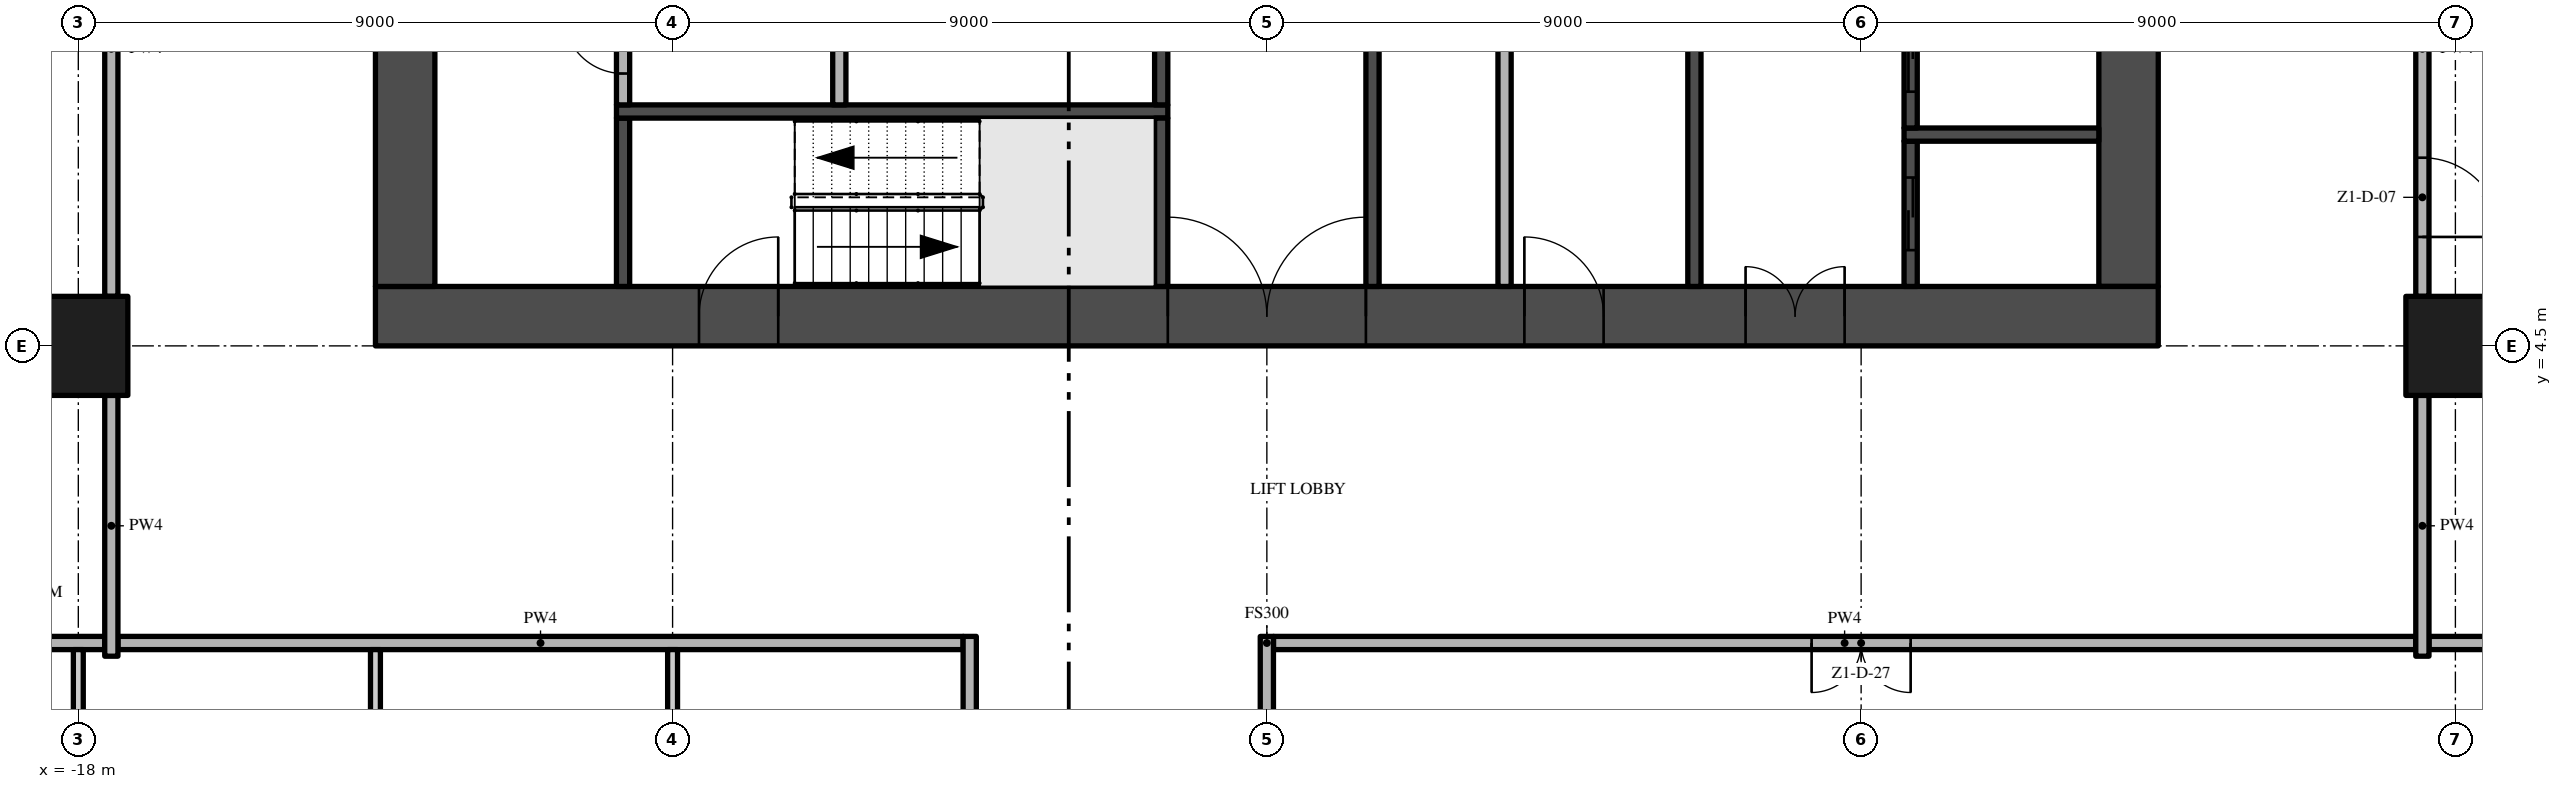
"""IFC4 building model, lengths in metres.
Left out: names, types, materials, properties, quantities, classifications, styles, units other than length and angle.
Written with IfcOpenShell. Run it as: python <this file> out.ifc"""

import sys

from ifc_helpers import new_model, si_unit, direction, frame, frame_2d, origin, origin_2d, place, context, subcontext, project, spatial, rectangle, extrude, element, fill, save


model = new_model("IFC4")
c1 = context("Model", 3, precision=1e-05, world=origin(), true_north=direction((0.0, 1.0)))
c2 = subcontext(c1, "Body", "Model", "MODEL_VIEW")
j1 = project(units=[si_unit("LENGTHUNIT", "METRE"), si_unit("PLANEANGLEUNIT", "RADIAN")], contexts=[c1])
p1 = place(None, origin())
s1 = spatial("IfcSite", under=j1, at=p1, CompositionType="ELEMENT")
p2 = place(p1, origin())
s2 = spatial("IfcBuilding", under=s1, at=p2, CompositionType="ELEMENT")
p3 = place(p2, frame((0.0, 0.0, 53.0)))
s3 = spatial("IfcBuildingStorey", under=s2, at=p3, CompositionType="ELEMENT", Elevation=53.0)
p4 = place(p3, frame((-13.5, 4.95, -0.3), z_axis=(0.0, 0.0, 1.0), x_axis=(1.0, 0.0, 0.0)))
e1 = element("IfcWall", 1, at=p4, inside=s3, PredefinedType="SHEAR", context=c2, shape_type="SweptSolid", body=[
    extrude(rectangle(XDim=27.0, YDim=0.9, at=frame_2d((13.5, 0.0))), origin(), (0.0, 0.0, 1.0), 3.8),
])
p5 = place(p4, frame((12.0, 0.0, 0.3)))
e2 = element("IfcOpeningElement", 2, at=p5, cuts=e1, PredefinedType="OPENING", context=c2, shape_type="SweptSolid", body=[
    extrude(rectangle(XDim=3.0, YDim=2.4, at=frame_2d((1.5, 1.2))), frame((0.0, 0.46, 0.0), z_axis=(0.0, -1.0, 0.0), x_axis=(1.0, 0.0, 0.0)), (0.0, 0.0, 1.0), 0.92),
])
p6 = place(p4, frame((4.9, 0.0, 0.3)))
e3 = element("IfcOpeningElement", 3, at=p6, cuts=e1, PredefinedType="OPENING", context=c2, shape_type="SweptSolid", body=[
    extrude(rectangle(XDim=1.2, YDim=2.2, at=frame_2d((0.6, 1.1))), frame((0.0, 0.46, 0.0), z_axis=(0.0, -1.0, 0.0), x_axis=(1.0, 0.0, 0.0)), (0.0, 0.0, 1.0), 0.92),
])
p7 = place(p4, frame((20.75, 0.0, 0.3)))
e4 = element("IfcOpeningElement", 4, at=p7, cuts=e1, PredefinedType="OPENING", context=c2, shape_type="SweptSolid", body=[
    extrude(rectangle(XDim=1.5, YDim=2.2, at=frame_2d((0.75, 1.1))), frame((0.0, 0.46, 0.0), z_axis=(0.0, -1.0, 0.0), x_axis=(1.0, 0.0, 0.0)), (0.0, 0.0, 1.0), 0.92),
])
p8 = place(p4, frame((17.4, 0.0, 0.3)))
e5 = element("IfcOpeningElement", 5, at=p8, cuts=e1, PredefinedType="OPENING", context=c2, shape_type="SweptSolid", body=[
    extrude(rectangle(XDim=1.2, YDim=2.2, at=frame_2d((0.6, 1.1))), frame((0.0, 0.46, 0.0), z_axis=(0.0, -1.0, 0.0), x_axis=(1.0, 0.0, 0.0)), (0.0, 0.0, 1.0), 0.92),
])
p9 = place(p3, frame((13.05, 5.4, -0.3), z_axis=(0.0, 0.0, 1.0), x_axis=(0.0, 1.0, 0.0)))
e6 = element("IfcWall", 6, at=p9, inside=s3, PredefinedType="SHEAR", context=c2, shape_type="SweptSolid", body=[
    extrude(rectangle(XDim=16.2, YDim=0.9, at=frame_2d((8.1, 0.0))), origin(), (0.0, 0.0, 1.0), 3.8),
])
p10 = place(p9, frame((6.0, 0.0, 0.3)))
e7 = element("IfcOpeningElement", 7, at=p10, cuts=e6, PredefinedType="OPENING", context=c2, shape_type="SweptSolid", body=[
    extrude(rectangle(XDim=1.2, YDim=2.2, at=frame_2d((0.6, 1.1))), frame((0.0, 0.46, 0.0), z_axis=(0.0, -1.0, 0.0), x_axis=(1.0, 0.0, 0.0)), (0.0, 0.0, 1.0), 0.92),
])
p11 = place(p3, frame((-13.05, 21.6, -0.3), z_axis=(0.0, 0.0, 1.0), x_axis=(0.0, -1.0, 0.0)))
e8 = element("IfcWall", 8, at=p11, inside=s3, PredefinedType="SHEAR", context=c2, shape_type="SweptSolid", body=[
    extrude(rectangle(XDim=16.2, YDim=0.9, at=frame_2d((8.1, 0.0))), origin(), (0.0, 0.0, 1.0), 3.8),
])
p12 = place(p11, frame((9.0, 0.0, 0.3)))
e9 = element("IfcOpeningElement", 9, at=p12, cuts=e8, PredefinedType="OPENING", context=c2, shape_type="SweptSolid", body=[
    extrude(rectangle(XDim=1.2, YDim=2.2, at=frame_2d((0.6, 1.1))), frame((0.0, 0.46, 0.0), z_axis=(0.0, -1.0, 0.0), x_axis=(1.0, 0.0, 0.0)), (0.0, 0.0, 1.0), 0.92),
])
for number, where, z_axis, x_axis in (
    (10, (-18.0, 4.5, 0.0), (0.0, 0.0, 1.0), (1.0, 0.0, 0.0)),
    (11, (18.0, 4.5, 0.0), (0.0, 0.0, 1.0), (1.0, 0.0, 0.0)),
):
    element("IfcColumn", number, at=place(p3, frame(where, z_axis=z_axis, x_axis=x_axis)), inside=s3, PredefinedType="COLUMN", context=c2, shape_type="SweptSolid", body=[
        extrude(rectangle(XDim=1.5, YDim=1.5, at=origin_2d()), origin(), (0.0, 0.0, 1.0), 3.5),
    ])
p13 = place(p3, frame((-9.75, 5.4, 0.0), z_axis=(0.0, 0.0, 1.0), x_axis=(0.0, 1.0, 0.0)))
e12 = element("IfcWall", 12, at=p13, inside=s3, PredefinedType="SHEAR", context=c2, shape_type="SweptSolid", body=[
    extrude(rectangle(XDim=2.55, YDim=0.2, at=frame_2d((1.275, 0.0))), origin(), (0.0, 0.0, 1.0), 3.5),
])
p14 = place(p3, frame((-9.85, 8.05, 0.0), z_axis=(0.0, 0.0, 1.0), x_axis=(1.0, 0.0, 0.0)))
e13 = element("IfcWall", 13, at=p14, inside=s3, PredefinedType="SHEAR", context=c2, shape_type="SweptSolid", body=[
    extrude(rectangle(XDim=8.35, YDim=0.2, at=frame_2d((4.175, 0.0))), origin(), (0.0, 0.0, 1.0), 3.5),
])
p15 = place(p3, frame((-9.75, 8.15, 0.0), z_axis=(0.0, 0.0, 1.0), x_axis=(0.0, 1.0, 0.0)))
e14 = element("IfcWall", 14, at=p15, inside=s3, PredefinedType="PARTITIONING", context=c2, shape_type="SweptSolid", body=[
    extrude(rectangle(XDim=1.85, YDim=0.2, at=frame_2d((0.925, 0.0))), origin(), (0.0, 0.0, 1.0), 3.5),
])
p16 = place(p15, frame((0.475, 0.0, 0.0)))
e15 = element("IfcOpeningElement", 15, at=p16, cuts=e14, PredefinedType="OPENING", context=c2, shape_type="SweptSolid", body=[
    extrude(rectangle(XDim=0.9, YDim=2.1, at=frame_2d((0.45, 1.05))), frame((0.0, 0.11, 0.0), z_axis=(0.0, -1.0, 0.0), x_axis=(1.0, 0.0, 0.0)), (0.0, 0.0, 1.0), 0.22),
])
p17 = place(p3, frame((-6.475, 8.15, 0.0), z_axis=(0.0, 0.0, 1.0), x_axis=(0.0, 1.0, 0.0)))
e16 = element("IfcWall", 16, at=p17, inside=s3, PredefinedType="PARTITIONING", context=c2, shape_type="SweptSolid", body=[
    extrude(rectangle(XDim=5.35, YDim=0.2, at=frame_2d((2.675, 0.0))), origin(), (0.0, 0.0, 1.0), 3.5),
])
p18 = place(p3, frame((-1.6, 5.4, 0.0), z_axis=(0.0, 0.0, 1.0), x_axis=(0.0, 1.0, 0.0)))
e17 = element("IfcWall", 17, at=p18, inside=s3, PredefinedType="SHEAR", context=c2, shape_type="SweptSolid", body=[
    extrude(rectangle(XDim=2.55, YDim=0.2, at=frame_2d((1.275, 0.0))), origin(), (0.0, 0.0, 1.0), 3.5),
])
p19 = place(p3, frame((-1.6, 8.15, 0.0), z_axis=(0.0, 0.0, 1.0), x_axis=(0.0, 1.0, 0.0)))
e18 = element("IfcWall", 18, at=p19, inside=s3, PredefinedType="SHEAR", context=c2, shape_type="SweptSolid", body=[
    extrude(rectangle(XDim=5.35, YDim=0.2, at=frame_2d((2.675, 0.0))), origin(), (0.0, 0.0, 1.0), 3.5),
])
p20 = place(p19, frame((2.225, 0.0, 0.0)))
e19 = element("IfcOpeningElement", 19, at=p20, cuts=e18, PredefinedType="OPENING", context=c2, shape_type="SweptSolid", body=[
    extrude(rectangle(XDim=0.9, YDim=2.1, at=frame_2d((0.45, 1.05))), frame((0.0, 0.11, 0.0), z_axis=(0.0, -1.0, 0.0), x_axis=(1.0, 0.0, 0.0)), (0.0, 0.0, 1.0), 0.22),
])
p21 = place(p3, frame((1.6, 13.5, 0.0), z_axis=(0.0, 0.0, 1.0), x_axis=(0.0, -1.0, 0.0)))
e20 = element("IfcWall", 20, at=p21, inside=s3, PredefinedType="SHEAR", context=c2, shape_type="SweptSolid", body=[
    extrude(rectangle(XDim=8.1, YDim=0.2, at=frame_2d((4.05, 0.0))), origin(), (0.0, 0.0, 1.0), 3.5),
])
p22 = place(p21, frame((3.2, 0.0, 0.0)))
e21 = element("IfcOpeningElement", 21, at=p22, cuts=e20, PredefinedType="OPENING", context=c2, shape_type="SweptSolid", body=[
    extrude(rectangle(XDim=0.9, YDim=2.1, at=frame_2d((0.45, 1.05))), frame((0.0, 0.11, 0.0), z_axis=(0.0, -1.0, 0.0), x_axis=(1.0, 0.0, 0.0)), (0.0, 0.0, 1.0), 0.22),
])
p23 = place(p3, frame((3.6, 13.5, 0.0), z_axis=(0.0, 0.0, 1.0), x_axis=(0.0, -1.0, 0.0)))
e22 = element("IfcWall", 22, at=p23, inside=s3, PredefinedType="PARTITIONING", context=c2, shape_type="SweptSolid", body=[
    extrude(rectangle(XDim=8.1, YDim=0.2, at=frame_2d((4.05, 0.0))), origin(), (0.0, 0.0, 1.0), 3.5),
])
p24 = place(p23, frame((3.6, 0.0, 0.0)))
e23 = element("IfcOpeningElement", 23, at=p24, cuts=e22, PredefinedType="OPENING", context=c2, shape_type="SweptSolid", body=[
    extrude(rectangle(XDim=0.9, YDim=2.1, at=frame_2d((0.45, 1.05))), frame((0.0, 0.11, 0.0), z_axis=(0.0, -1.0, 0.0), x_axis=(1.0, 0.0, 0.0)), (0.0, 0.0, 1.0), 0.22),
])
p25 = place(p3, frame((6.475, 5.4, 0.0), z_axis=(0.0, 0.0, 1.0), x_axis=(0.0, 1.0, 0.0)))
e24 = element("IfcWall", 24, at=p25, inside=s3, PredefinedType="SHEAR", context=c2, shape_type="SweptSolid", body=[
    extrude(rectangle(XDim=6.7, YDim=0.2, at=frame_2d((3.35, 0.0))), origin(), (0.0, 0.0, 1.0), 3.5),
])
p26 = place(p3, frame((9.75, 5.4, 0.0), z_axis=(0.0, 0.0, 1.0), x_axis=(0.0, 1.0, 0.0)))
e25 = element("IfcWall", 25, at=p26, inside=s3, PredefinedType="SHEAR", context=c2, shape_type="SweptSolid", body=[
    extrude(rectangle(XDim=2.2, YDim=0.2, at=frame_2d((1.1, 0.0))), origin(), (0.0, 0.0, 1.0), 3.5),
])
p27 = place(p26, frame((0.55, 0.0, 0.0)))
e26 = element("IfcOpeningElement", 26, at=p27, cuts=e25, PredefinedType="OPENING", context=c2, shape_type="SweptSolid", body=[
    extrude(rectangle(XDim=1.1, YDim=2.1, at=frame_2d((0.55, 1.05))), frame((0.0, 0.11, 0.0), z_axis=(0.0, -1.0, 0.0), x_axis=(1.0, 0.0, 0.0)), (0.0, 0.0, 1.0), 0.22),
])
p28 = place(p3, frame((9.65, 7.7, 0.0), z_axis=(0.0, 0.0, 1.0), x_axis=(1.0, 0.0, 0.0)))
e27 = element("IfcWall", 27, at=p28, inside=s3, PredefinedType="SHEAR", context=c2, shape_type="SweptSolid", body=[
    extrude(rectangle(XDim=2.95, YDim=0.2, at=frame_2d((1.475, 0.0))), origin(), (0.0, 0.0, 1.0), 3.5),
])
p29 = place(p3, frame((9.75, 7.8, 0.0), z_axis=(0.0, 0.0, 1.0), x_axis=(0.0, 1.0, 0.0)))
e28 = element("IfcWall", 28, at=p29, inside=s3, PredefinedType="SHEAR", context=c2, shape_type="SweptSolid", body=[
    extrude(rectangle(XDim=2.2, YDim=0.2, at=frame_2d((1.1, 0.0))), origin(), (0.0, 0.0, 1.0), 3.5),
])
p30 = place(p29, frame((0.55, 0.0, 0.0)))
e29 = element("IfcOpeningElement", 29, at=p30, cuts=e28, PredefinedType="OPENING", context=c2, shape_type="SweptSolid", body=[
    extrude(rectangle(XDim=1.1, YDim=2.1, at=frame_2d((0.55, 1.05))), frame((0.0, 0.11, 0.0), z_axis=(0.0, -1.0, 0.0), x_axis=(1.0, 0.0, 0.0)), (0.0, 0.0, 1.0), 0.22),
])
p31 = place(p3, frame((-17.4, 0.0, 0.0), z_axis=(0.0, 0.0, 1.0), x_axis=(1.0, 0.0, 0.0)))
e30 = element("IfcWall", 30, at=p31, inside=s3, PredefinedType="PARTITIONING", context=c2, shape_type="SweptSolid", body=[
    extrude(rectangle(XDim=12.8, YDim=0.2, at=frame_2d((6.4, 0.0))), origin(), (0.0, 0.0, 1.0), 3.5),
])
p32 = place(p3, frame((17.4, 0.0, 0.0), z_axis=(0.0, 0.0, 1.0), x_axis=(-1.0, 0.0, 0.0)))
e31 = element("IfcWall", 31, at=p32, inside=s3, PredefinedType="PARTITIONING", context=c2, shape_type="SweptSolid", body=[
    extrude(rectangle(XDim=17.3, YDim=0.2, at=frame_2d((8.65, 0.0))), origin(), (0.0, 0.0, 1.0), 3.5),
])
p33 = place(p32, frame((7.65, 0.0, 0.0)))
e32 = element("IfcOpeningElement", 32, at=p33, cuts=e31, PredefinedType="OPENING", context=c2, shape_type="SweptSolid", body=[
    extrude(rectangle(XDim=1.5, YDim=2.4, at=frame_2d((0.75, 1.2))), frame((0.0, 0.11, 0.0), z_axis=(0.0, -1.0, 0.0), x_axis=(1.0, 0.0, 0.0)), (0.0, 0.0, 1.0), 0.22),
])
for number, where, z_axis, x_axis in (
    (33, (-26.7, 0.0, 0.0), (0.0, 0.0, 1.0), (1.0, 0.0, 0.0)),
    (34, (17.6, 0.0, 0.0), (0.0, 0.0, 1.0), (1.0, 0.0, 0.0)),
):
    element("IfcWall", number, at=place(p3, frame(where, z_axis=z_axis, x_axis=x_axis)), inside=s3, PredefinedType="PARTITIONING", context=c2, shape_type="SweptSolid", body=[
        extrude(rectangle(XDim=9.1, YDim=0.2, at=frame_2d((4.55, 0.0))), origin(), (0.0, 0.0, 1.0), 3.5),
    ])
p34 = place(p3, frame((-18.0, -3.75, 0.0), z_axis=(0.0, 0.0, 1.0), x_axis=(0.0, 1.0, 0.0)))
e35 = element("IfcWall", 35, at=p34, inside=s3, PredefinedType="PARTITIONING", context=c2, shape_type="SweptSolid", body=[
    extrude(rectangle(XDim=3.65, YDim=0.15, at=frame_2d((1.825, 0.0))), origin(), (0.0, 0.0, 1.0), 3.5),
])
p35 = place(p34, frame((0.15, 0.0, 0.0)))
e36 = element("IfcOpeningElement", 36, at=p35, cuts=e35, PredefinedType="OPENING", context=c2, shape_type="SweptSolid", body=[
    extrude(rectangle(XDim=1.0, YDim=2.4, at=frame_2d((0.5, 1.2))), frame((0.0, 0.085, 0.0), z_axis=(0.0, -1.0, 0.0), x_axis=(1.0, 0.0, 0.0)), (0.0, 0.0, 1.0), 0.17),
])
p36 = place(p3, frame((-17.5, -0.2, 0.0), z_axis=(0.0, 0.0, 1.0), x_axis=(0.0, 1.0, 0.0)))
e37 = element("IfcWall", 37, at=p36, inside=s3, PredefinedType="PARTITIONING", context=c2, shape_type="SweptSolid", body=[
    extrude(rectangle(XDim=3.95, YDim=0.2, at=frame_2d((1.975, 0.0))), origin(), (0.0, 0.0, 1.0), 3.5),
])
p37 = place(p3, frame((-17.5, 5.25, 0.0), z_axis=(0.0, 0.0, 1.0), x_axis=(0.0, 1.0, 0.0)))
e38 = element("IfcWall", 38, at=p37, inside=s3, PredefinedType="PARTITIONING", context=c2, shape_type="SweptSolid", body=[
    extrude(rectangle(XDim=7.5, YDim=0.2, at=frame_2d((3.75, 0.0))), origin(), (0.0, 0.0, 1.0), 3.5),
])
p38 = place(p3, frame((-13.5, -8.325, 0.0), z_axis=(0.0, 0.0, 1.0), x_axis=(0.0, 1.0, 0.0)))
e39 = element("IfcWall", 39, at=p38, inside=s3, PredefinedType="PARTITIONING", context=c2, shape_type="SweptSolid", body=[
    extrude(rectangle(XDim=8.225, YDim=0.15, at=frame_2d((4.112, 0.0))), origin(), (0.0, 0.0, 1.0), 3.5),
])
p39 = place(p3, frame((-9.0, -3.75, 0.0), z_axis=(0.0, 0.0, 1.0), x_axis=(0.0, 1.0, 0.0)))
e40 = element("IfcWall", 40, at=p39, inside=s3, PredefinedType="PARTITIONING", context=c2, shape_type="SweptSolid", body=[
    extrude(rectangle(XDim=3.65, YDim=0.15, at=frame_2d((1.825, 0.0))), origin(), (0.0, 0.0, 1.0), 3.5),
])
p40 = place(p39, frame((0.25, 0.0, 0.0)))
e41 = element("IfcOpeningElement", 41, at=p40, cuts=e40, PredefinedType="OPENING", context=c2, shape_type="SweptSolid", body=[
    extrude(rectangle(XDim=1.0, YDim=2.4, at=frame_2d((0.5, 1.2))), frame((0.0, 0.085, 0.0), z_axis=(0.0, -1.0, 0.0), x_axis=(1.0, 0.0, 0.0)), (0.0, 0.0, 1.0), 0.17),
])
p41 = place(p3, frame((-4.5, -22.2, 0.0), z_axis=(0.0, 0.0, 1.0), x_axis=(0.0, 1.0, 0.0)))
e42 = element("IfcWall", 42, at=p41, inside=s3, PredefinedType="PARTITIONING", context=c2, shape_type="SweptSolid", body=[
    extrude(rectangle(XDim=22.3, YDim=0.2, at=frame_2d((11.15, 0.0))), origin(), (0.0, 0.0, 1.0), 3.5),
])
p42 = place(p41, frame((10.2, 0.0, 0.0)))
e43 = element("IfcOpeningElement", 43, at=p42, cuts=e42, PredefinedType="OPENING", context=c2, shape_type="SweptSolid", body=[
    extrude(rectangle(XDim=1.5, YDim=2.4, at=frame_2d((0.75, 1.2))), frame((0.0, 0.11, 0.0), z_axis=(0.0, -1.0, 0.0), x_axis=(1.0, 0.0, 0.0)), (0.0, 0.0, 1.0), 0.22),
])
p43 = place(p3, frame((0.0, -3.75, 0.0), z_axis=(0.0, 0.0, 1.0), x_axis=(0.0, 1.0, 0.0)))
e44 = element("IfcWall", 44, at=p43, inside=s3, PredefinedType="PARTITIONING", context=c2, shape_type="SweptSolid", body=[
    extrude(rectangle(XDim=3.85, YDim=0.2, at=frame_2d((1.925, 0.0))), origin(), (0.0, 0.0, 1.0), 3.5),
])
p44 = place(p3, frame((17.5, -0.2, 0.0), z_axis=(0.0, 0.0, 1.0), x_axis=(0.0, 1.0, 0.0)))
e45 = element("IfcWall", 45, at=p44, inside=s3, PredefinedType="PARTITIONING", context=c2, shape_type="SweptSolid", body=[
    extrude(rectangle(XDim=3.95, YDim=0.2, at=frame_2d((1.975, 0.0))), origin(), (0.0, 0.0, 1.0), 3.5),
])
p45 = place(p3, frame((17.5, 12.75, 0.0), z_axis=(0.0, 0.0, 1.0), x_axis=(0.0, -1.0, 0.0)))
e46 = element("IfcWall", 46, at=p45, inside=s3, PredefinedType="PARTITIONING", context=c2, shape_type="SweptSolid", body=[
    extrude(rectangle(XDim=7.5, YDim=0.2, at=frame_2d((3.75, 0.0))), origin(), (0.0, 0.0, 1.0), 3.5),
])
p46 = place(p45, frame((5.4, 0.0, 0.0)))
e47 = element("IfcOpeningElement", 47, at=p46, cuts=e46, PredefinedType="OPENING", context=c2, shape_type="SweptSolid", body=[
    extrude(rectangle(XDim=1.2, YDim=2.4, at=frame_2d((0.6, 1.2))), frame((0.0, 0.11, 0.0), z_axis=(0.0, -1.0, 0.0), x_axis=(1.0, 0.0, 0.0)), (0.0, 0.0, 1.0), 0.22),
])
p47 = place(p5, frame((3.0, 0.0, 0.0), z_axis=(0.0, 0.0, 1.0), x_axis=(-1.0, 0.0, 0.0)))
e48 = element("IfcDoor", 48, at=p47, inside=s3, OperationType="DOUBLE_DOOR_SINGLE_SWING", PredefinedType="DOOR", context=c2, shape_type="SweptSolid", body=[
    extrude(rectangle(XDim=3.0, YDim=2.4, at=frame_2d((1.5, 1.2))), frame((0.0, 0.025, 0.0), z_axis=(0.0, -1.0, 0.0), x_axis=(1.0, 0.0, 0.0)), (0.0, 0.0, 1.0), 0.05),
])
fill(e2, e48)
p48 = place(p6, frame((1.2, 0.0, 0.0), z_axis=(0.0, 0.0, 1.0), x_axis=(-1.0, 0.0, 0.0)))
e49 = element("IfcDoor", 49, at=p48, inside=s3, OperationType="SINGLE_SWING_LEFT", PredefinedType="DOOR", context=c2, shape_type="SweptSolid", body=[
    extrude(rectangle(XDim=1.2, YDim=2.2, at=frame_2d((0.6, 1.1))), frame((0.0, 0.025, 0.0), z_axis=(0.0, -1.0, 0.0), x_axis=(1.0, 0.0, 0.0)), (0.0, 0.0, 1.0), 0.05),
])
fill(e3, e49)
p49 = place(p7, frame((1.5, 0.0, 0.0), z_axis=(0.0, 0.0, 1.0), x_axis=(-1.0, 0.0, 0.0)))
e50 = element("IfcDoor", 50, at=p49, inside=s3, OperationType="DOUBLE_DOOR_SINGLE_SWING", PredefinedType="DOOR", context=c2, shape_type="SweptSolid", body=[
    extrude(rectangle(XDim=1.5, YDim=2.2, at=frame_2d((0.75, 1.1))), frame((0.0, 0.025, 0.0), z_axis=(0.0, -1.0, 0.0), x_axis=(1.0, 0.0, 0.0)), (0.0, 0.0, 1.0), 0.05),
])
fill(e4, e50)
p50 = place(p8, frame((1.2, 0.0, 0.0), z_axis=(0.0, 0.0, 1.0), x_axis=(-1.0, 0.0, 0.0)))
e51 = element("IfcDoor", 51, at=p50, inside=s3, OperationType="SINGLE_SWING_RIGHT", PredefinedType="DOOR", context=c2, shape_type="SweptSolid", body=[
    extrude(rectangle(XDim=1.2, YDim=2.2, at=frame_2d((0.6, 1.1))), frame((0.0, 0.025, 0.0), z_axis=(0.0, -1.0, 0.0), x_axis=(1.0, 0.0, 0.0)), (0.0, 0.0, 1.0), 0.05),
])
fill(e5, e51)
p51 = place(p27, origin())
e52 = element("IfcDoor", 52, at=p51, inside=s3, OperationType="SLIDING_TO_RIGHT", PredefinedType="DOOR", context=c2, shape_type="SweptSolid", body=[
    extrude(rectangle(XDim=1.1, YDim=2.1, at=frame_2d((0.55, 1.05))), frame((0.0, 0.025, 0.0), z_axis=(0.0, -1.0, 0.0), x_axis=(1.0, 0.0, 0.0)), (0.0, 0.0, 1.0), 0.05),
])
fill(e26, e52)
p52 = place(p30, origin())
e53 = element("IfcDoor", 53, at=p52, inside=s3, OperationType="SLIDING_TO_RIGHT", PredefinedType="DOOR", context=c2, shape_type="SweptSolid", body=[
    extrude(rectangle(XDim=1.1, YDim=2.1, at=frame_2d((0.55, 1.05))), frame((0.0, 0.025, 0.0), z_axis=(0.0, -1.0, 0.0), x_axis=(1.0, 0.0, 0.0)), (0.0, 0.0, 1.0), 0.05),
])
fill(e29, e53)
p53 = place(p16, origin())
e54 = element("IfcDoor", 54, at=p53, inside=s3, OperationType="SINGLE_SWING_RIGHT", PredefinedType="DOOR", context=c2, shape_type="SweptSolid", body=[
    extrude(rectangle(XDim=0.9, YDim=2.1, at=frame_2d((0.45, 1.05))), frame((0.0, 0.025, 0.0), z_axis=(0.0, -1.0, 0.0), x_axis=(1.0, 0.0, 0.0)), (0.0, 0.0, 1.0), 0.05),
])
fill(e15, e54)
p54 = place(p46, origin())
e55 = element("IfcDoor", 55, at=p54, inside=s3, OperationType="SINGLE_SWING_RIGHT", PredefinedType="DOOR", context=c2, shape_type="SweptSolid", body=[
    extrude(rectangle(XDim=1.2, YDim=2.4, at=frame_2d((0.6, 1.2))), frame((0.0, 0.025, 0.0), z_axis=(0.0, -1.0, 0.0), x_axis=(1.0, 0.0, 0.0)), (0.0, 0.0, 1.0), 0.05),
])
fill(e47, e55)
p55 = place(p33, origin())
e56 = element("IfcDoor", 56, at=p55, inside=s3, OperationType="DOUBLE_DOOR_SINGLE_SWING", PredefinedType="DOOR", context=c2, shape_type="SweptSolid", body=[
    extrude(rectangle(XDim=1.5, YDim=2.4, at=frame_2d((0.75, 1.2))), frame((0.0, 0.025, 0.0), z_axis=(0.0, -1.0, 0.0), x_axis=(1.0, 0.0, 0.0)), (0.0, 0.0, 1.0), 0.05),
])
fill(e32, e56)
save(model, sys.argv[1])
